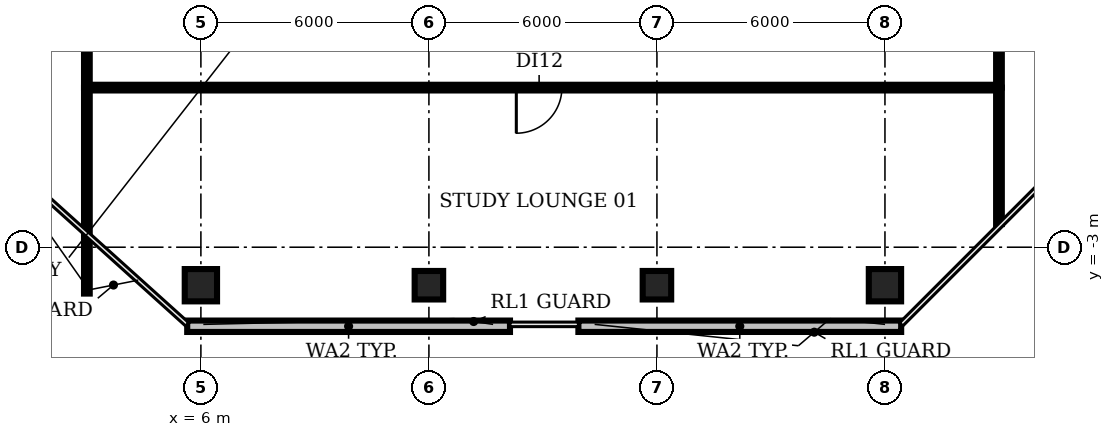
"""IFC4 building model, lengths in metres.
Left out: names, types, materials, properties, quantities, classifications, styles, units other than length and angle.
Written with IfcOpenShell. Run it as: python <this file> out.ifc"""

import sys

from ifc_helpers import new_model, si_unit, direction, frame, frame_2d, origin, origin_2d, place, context, subcontext, project, spatial, rectangle, circle, extrude, element, fill, save


model = new_model("IFC4")
c1 = context("Model", 3, precision=1e-05, world=origin(), true_north=direction((0.0, 1.0)))
c2 = subcontext(c1, "Body", "Model", "MODEL_VIEW")
j1 = project(units=[si_unit("LENGTHUNIT", "METRE"), si_unit("PLANEANGLEUNIT", "RADIAN")], contexts=[c1])
p1 = place(None, origin())
s1 = spatial("IfcSite", under=j1, at=p1, CompositionType="ELEMENT")
p2 = place(p1, origin())
s2 = spatial("IfcBuilding", under=s1, at=p2, CompositionType="ELEMENT")
p3 = place(p2, frame((0.0, 0.0, 268.4)))
s3 = spatial("IfcBuildingStorey", under=s2, at=p3, CompositionType="ELEMENT", Elevation=268.4)
p4 = place(p3, frame((6.0, -4.0, 0.0), z_axis=(0.0, 0.0, 1.0), x_axis=(1.0, 0.0, 0.0)))
e1 = element("IfcColumn", 1, at=p4, inside=s3, PredefinedType="COLUMN", context=c2, shape_type="SweptSolid", body=[
    extrude(circle(Radius=0.425, at=origin_2d()), origin(), (0.0, 0.0, 1.0), 3.8),
])
for number, where, z_axis, x_axis in (
    (2, (12.0, -4.0, 0.0), (0.0, 0.0, 1.0), (1.0, 0.0, 0.0)),
    (3, (18.0, -4.0, 0.0), (0.0, 0.0, 1.0), (1.0, 0.0, 0.0)),
):
    element("IfcColumn", number, at=place(p3, frame(where, z_axis=z_axis, x_axis=x_axis)), inside=s3, PredefinedType="COLUMN", context=c2, shape_type="SweptSolid", body=[
        extrude(rectangle(XDim=0.75, YDim=0.75, at=origin_2d()), origin(), (0.0, 0.0, 1.0), 3.8),
    ])
p5 = place(p3, frame((24.0, -4.0, 0.0), z_axis=(0.0, 0.0, 1.0), x_axis=(1.0, 0.0, 0.0)))
e4 = element("IfcColumn", 4, at=p5, inside=s3, PredefinedType="COLUMN", context=c2, shape_type="SweptSolid", body=[
    extrude(circle(Radius=0.425, at=origin_2d()), origin(), (0.0, 0.0, 1.0), 3.8),
])
p6 = place(p3, frame((5.64, -5.08, 0.0), z_axis=(0.0, 0.0, 1.0), x_axis=(1.0, 0.0, 0.0)))
e5 = element("IfcWall", 5, at=p6, inside=s3, PredefinedType="SOLIDWALL", context=c2, shape_type="SweptSolid", body=[
    extrude(rectangle(XDim=8.493, YDim=0.3, at=frame_2d((4.247, 0.0))), origin(), (0.0, 0.0, 1.0), 3.8),
])
p7 = place(p3, frame((15.933, -5.08, 0.0), z_axis=(0.0, 0.0, 1.0), x_axis=(1.0, 0.0, 0.0)))
e6 = element("IfcWall", 6, at=p7, inside=s3, PredefinedType="SOLIDWALL", context=c2, shape_type="SweptSolid", body=[
    extrude(rectangle(XDim=8.493, YDim=0.3, at=frame_2d((4.247, 0.0))), origin(), (0.0, 0.0, 1.0), 3.8),
])
p8 = place(p3, frame((3.0, -4.22, 0.0), z_axis=(0.0, 0.0, 1.0), x_axis=(0.0, 1.0, 0.0)))
e7 = element("IfcWall", 7, at=p8, inside=s3, PredefinedType="PARTITIONING", context=c2, shape_type="SweptSolid", body=[
    extrude(rectangle(XDim=5.42, YDim=0.15, at=frame_2d((2.71, 0.0))), origin(), (0.0, 0.0, 1.0), 2.85),
])
p9 = place(p3, frame((3.0, 1.2, 0.0), z_axis=(0.0, 0.0, 1.0), x_axis=(0.0, 1.0, 0.0)))
e8 = element("IfcWall", 8, at=p9, inside=s3, PredefinedType="PARTITIONING", context=c2, shape_type="SweptSolid", body=[
    extrude(rectangle(XDim=3.9, YDim=0.15, at=frame_2d((1.95, 0.0))), origin(), (0.0, 0.0, 1.0), 2.85),
])
p10 = place(p3, frame((27.0, -2.39, 0.0), z_axis=(0.0, 0.0, 1.0), x_axis=(0.0, 1.0, 0.0)))
e9 = element("IfcWall", 9, at=p10, inside=s3, PredefinedType="PARTITIONING", context=c2, shape_type="SweptSolid", body=[
    extrude(rectangle(XDim=3.59, YDim=0.15, at=frame_2d((1.795, 0.0))), origin(), (0.0, 0.0, 1.0), 2.85),
])
p11 = place(p3, frame((27.0, 1.2, 0.0), z_axis=(0.0, 0.0, 1.0), x_axis=(-1.0, 0.0, 0.0)))
e10 = element("IfcWall", 10, at=p11, inside=s3, PredefinedType="PARTITIONING", context=c2, shape_type="SweptSolid", body=[
    extrude(rectangle(XDim=24.0, YDim=0.15, at=frame_2d((12.0, 0.0))), origin(), (0.0, 0.0, 1.0), 2.85),
])
p12 = place(p11, frame((11.5, 0.0, 0.0)))
e11 = element("IfcOpeningElement", 11, at=p12, cuts=e10, PredefinedType="OPENING", context=c2, shape_type="SweptSolid", body=[
    extrude(rectangle(XDim=1.2, YDim=2.1, at=frame_2d((0.6, 1.05))), frame((0.0, 0.085, 0.0), z_axis=(0.0, -1.0, 0.0), x_axis=(1.0, 0.0, 0.0)), (0.0, 0.0, 1.0), 0.17),
])
p13 = place(p3, frame((27.0, 1.2, 0.0), z_axis=(0.0, 0.0, 1.0), x_axis=(0.0, 1.0, 0.0)))
e12 = element("IfcWall", 12, at=p13, inside=s3, PredefinedType="PARTITIONING", context=c2, shape_type="SweptSolid", body=[
    extrude(rectangle(XDim=3.9, YDim=0.15, at=frame_2d((1.95, 0.0))), origin(), (0.0, 0.0, 1.0), 2.85),
])
p14 = place(p13, frame((1.4, 0.0, 0.0)))
e13 = element("IfcOpeningElement", 13, at=p14, cuts=e12, PredefinedType="OPENING", context=c2, shape_type="SweptSolid", body=[
    extrude(rectangle(XDim=1.2, YDim=2.1, at=frame_2d((0.6, 1.05))), frame((0.0, 0.085, 0.0), z_axis=(0.0, -1.0, 0.0), x_axis=(1.0, 0.0, 0.0)), (0.0, 0.0, 1.0), 0.17),
])
p15 = place(p12, origin())
e14 = element("IfcDoor", 14, at=p15, inside=s3, OperationType="SINGLE_SWING_RIGHT", PredefinedType="DOOR", context=c2, shape_type="SweptSolid", body=[
    extrude(rectangle(XDim=1.2, YDim=2.1, at=frame_2d((0.6, 1.05))), frame((0.0, 0.025, 0.0), z_axis=(0.0, -1.0, 0.0), x_axis=(1.0, 0.0, 0.0)), (0.0, 0.0, 1.0), 0.05),
])
fill(e11, e14)
save(model, sys.argv[1])
